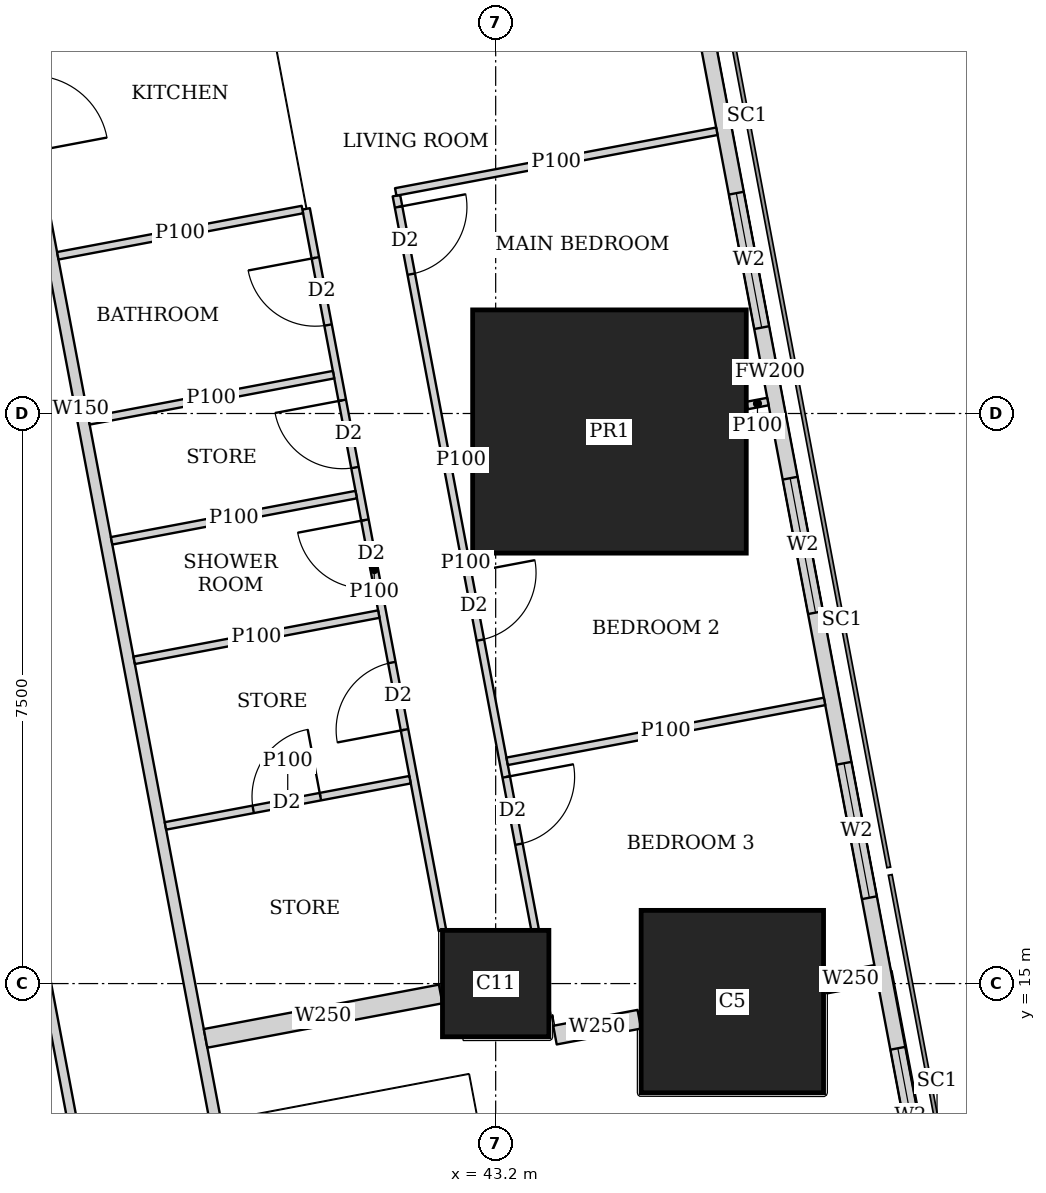
"""IFC4 building model, lengths in metres.
Left out: names, types, materials, properties, quantities, classifications, styles, units other than length and angle.
Written with IfcOpenShell. Run it as: python <this file> out.ifc"""

import sys

from ifc_helpers import new_model, si_unit, direction, frame, frame_2d, origin, origin_2d, place, context, subcontext, project, spatial, rectangle, extrude, element, fill, save


model = new_model("IFC4")
c1 = context("Model", 3, precision=1e-05, world=origin(), true_north=direction((0.0, 1.0)))
c2 = subcontext(c1, "Body", "Model", "MODEL_VIEW")
j1 = project(units=[si_unit("LENGTHUNIT", "METRE"), si_unit("PLANEANGLEUNIT", "RADIAN")], contexts=[c1])
p1 = place(None, origin())
s1 = spatial("IfcSite", under=j1, at=p1, CompositionType="ELEMENT")
p2 = place(p1, origin())
s2 = spatial("IfcBuilding", under=s1, at=p2, CompositionType="ELEMENT")
p3 = place(p2, frame((0.0, 0.0, 242.45)))
s3 = spatial("IfcBuildingStorey", under=s2, at=p3, CompositionType="ELEMENT", Elevation=242.45)
p4 = place(p3, frame((43.2, 15.0, 0.0), z_axis=(0.0, 0.0, 1.0), x_axis=(1.0, 0.0, 0.0)))
e1 = element("IfcColumn", 1, at=p4, inside=s3, PredefinedType="COLUMN", context=c2, shape_type="SweptSolid", body=[
    extrude(rectangle(XDim=1.4, YDim=1.4, at=origin_2d()), origin(), (0.0, 0.0, 1.0), 3.75),
])
p5 = place(p3, frame((46.314, 14.763, 0.0), z_axis=(0.0, 0.0, 1.0), x_axis=(1.0, 0.0, 0.0)))
e2 = element("IfcColumn", 2, at=p5, inside=s3, PredefinedType="COLUMN", context=c2, shape_type="SweptSolid", body=[
    extrude(rectangle(XDim=2.4, YDim=2.4, at=origin_2d()), origin(), (0.0, 0.0, 1.0), 3.75),
])
p6 = place(p3, frame((44.697, 22.263, 0.0), z_axis=(0.0, 0.0, 1.0), x_axis=(1.0, 0.0, 0.0)))
e3 = element("IfcColumn", 3, at=p6, inside=s3, PredefinedType="COLUMN", context=c2, shape_type="SweptSolid", body=[
    extrude(rectangle(XDim=3.6, YDim=3.2, at=origin_2d()), origin(), (0.0, 0.0, 1.0), 3.75),
])
p7 = place(p3, frame((50.653, 2.703, 0.0), z_axis=(0.0, 0.0, 1.0), x_axis=(-0.185612026696, 0.982623109613, 0.0)))
e4 = element("IfcWall", 4, at=p7, inside=s3, PredefinedType="SOLIDWALL", context=c2, shape_type="SweptSolid", body=[
    extrude(rectangle(XDim=41.393, YDim=0.2, at=frame_2d((20.697, 0.0))), origin(), (0.0, 0.0, 1.0), 3.45),
])
p8 = place(p7, frame((1.633, 0.0, 0.9)))
e5 = element("IfcOpeningElement", 5, at=p8, cuts=e4, PredefinedType="OPENING", context=c2, shape_type="SweptSolid", body=[
    extrude(rectangle(XDim=1.8, YDim=1.5, at=frame_2d((0.9, 0.75))), frame((0.0, 0.11, 0.0), z_axis=(0.0, -1.0, 0.0), x_axis=(1.0, 0.0, 0.0)), (0.0, 0.0, 1.0), 0.22),
])
p9 = place(p7, frame((6.032, 0.0, 0.9)))
e6 = element("IfcOpeningElement", 6, at=p9, cuts=e4, PredefinedType="OPENING", context=c2, shape_type="SweptSolid", body=[
    extrude(rectangle(XDim=1.8, YDim=1.5, at=frame_2d((0.9, 0.75))), frame((0.0, 0.11, 0.0), z_axis=(0.0, -1.0, 0.0), x_axis=(1.0, 0.0, 0.0)), (0.0, 0.0, 1.0), 0.22),
])
p10 = place(p7, frame((9.848, 0.0, 0.9)))
e7 = element("IfcOpeningElement", 7, at=p10, cuts=e4, PredefinedType="OPENING", context=c2, shape_type="SweptSolid", body=[
    extrude(rectangle(XDim=1.8, YDim=1.5, at=frame_2d((0.9, 0.75))), frame((0.0, 0.11, 0.0), z_axis=(0.0, -1.0, 0.0), x_axis=(1.0, 0.0, 0.0)), (0.0, 0.0, 1.0), 0.22),
])
p11 = place(p7, frame((13.664, 0.0, 0.9)))
e8 = element("IfcOpeningElement", 8, at=p11, cuts=e4, PredefinedType="OPENING", context=c2, shape_type="SweptSolid", body=[
    extrude(rectangle(XDim=1.8, YDim=1.5, at=frame_2d((0.9, 0.75))), frame((0.0, 0.11, 0.0), z_axis=(0.0, -1.0, 0.0), x_axis=(1.0, 0.0, 0.0)), (0.0, 0.0, 1.0), 0.22),
])
p12 = place(p7, frame((17.481, 0.0, 0.9)))
e9 = element("IfcOpeningElement", 9, at=p12, cuts=e4, PredefinedType="OPENING", context=c2, shape_type="SweptSolid", body=[
    extrude(rectangle(XDim=1.8, YDim=1.5, at=frame_2d((0.9, 0.75))), frame((0.0, 0.11, 0.0), z_axis=(0.0, -1.0, 0.0), x_axis=(1.0, 0.0, 0.0)), (0.0, 0.0, 1.0), 0.22),
])
p13 = place(p7, frame((21.297, 0.0, 0.9)))
e10 = element("IfcOpeningElement", 10, at=p13, cuts=e4, PredefinedType="OPENING", context=c2, shape_type="SweptSolid", body=[
    extrude(rectangle(XDim=1.8, YDim=1.5, at=frame_2d((0.9, 0.75))), frame((0.0, 0.11, 0.0), z_axis=(0.0, -1.0, 0.0), x_axis=(1.0, 0.0, 0.0)), (0.0, 0.0, 1.0), 0.22),
])
p14 = place(p7, frame((25.113, 0.0, 0.9)))
e11 = element("IfcOpeningElement", 11, at=p14, cuts=e4, PredefinedType="OPENING", context=c2, shape_type="SweptSolid", body=[
    extrude(rectangle(XDim=1.8, YDim=1.5, at=frame_2d((0.9, 0.75))), frame((0.0, 0.11, 0.0), z_axis=(0.0, -1.0, 0.0), x_axis=(1.0, 0.0, 0.0)), (0.0, 0.0, 1.0), 0.22),
])
p15 = place(p7, frame((28.93, 0.0, 0.9)))
e12 = element("IfcOpeningElement", 12, at=p15, cuts=e4, PredefinedType="OPENING", context=c2, shape_type="SweptSolid", body=[
    extrude(rectangle(XDim=1.8, YDim=1.5, at=frame_2d((0.9, 0.75))), frame((0.0, 0.11, 0.0), z_axis=(0.0, -1.0, 0.0), x_axis=(1.0, 0.0, 0.0)), (0.0, 0.0, 1.0), 0.22),
])
p16 = place(p7, frame((32.746, 0.0, 0.9)))
e13 = element("IfcOpeningElement", 13, at=p16, cuts=e4, PredefinedType="OPENING", context=c2, shape_type="SweptSolid", body=[
    extrude(rectangle(XDim=1.8, YDim=1.5, at=frame_2d((0.9, 0.75))), frame((0.0, 0.11, 0.0), z_axis=(0.0, -1.0, 0.0), x_axis=(1.0, 0.0, 0.0)), (0.0, 0.0, 1.0), 0.22),
])
p17 = place(p7, frame((36.481, 0.0, 0.9)))
e14 = element("IfcOpeningElement", 14, at=p17, cuts=e4, PredefinedType="OPENING", context=c2, shape_type="SweptSolid", body=[
    extrude(rectangle(XDim=1.8, YDim=1.5, at=frame_2d((0.9, 0.75))), frame((0.0, 0.11, 0.0), z_axis=(0.0, -1.0, 0.0), x_axis=(1.0, 0.0, 0.0)), (0.0, 0.0, 1.0), 0.22),
])
p18 = place(p3, frame((33.933, 42.73, 0.0), z_axis=(0.0, 0.0, 1.0), x_axis=(0.185595417643, -0.982626246825, 0.0)))
e15 = element("IfcWall", 15, at=p18, inside=s3, PredefinedType="SOLIDWALL", context=c2, shape_type="SweptSolid", body=[
    extrude(rectangle(XDim=41.051, YDim=0.15, at=frame_2d((20.525, 0.0))), origin(), (0.0, 0.0, 1.0), 2.45),
])
p19 = place(p18, frame((12.266, 0.0, 0.0)))
e16 = element("IfcOpeningElement", 16, at=p19, cuts=e15, PredefinedType="OPENING", context=c2, shape_type="SweptSolid", body=[
    extrude(rectangle(XDim=1.0, YDim=2.1, at=frame_2d((0.5, 1.05))), frame((0.0, 0.085, 0.0), z_axis=(0.0, -1.0, 0.0), x_axis=(1.0, 0.0, 0.0)), (0.0, 0.0, 1.0), 0.17),
])
p20 = place(p18, frame((16.082, 0.0, 0.0)))
e17 = element("IfcOpeningElement", 17, at=p20, cuts=e15, PredefinedType="OPENING", context=c2, shape_type="SweptSolid", body=[
    extrude(rectangle(XDim=1.0, YDim=2.1, at=frame_2d((0.5, 1.05))), frame((0.0, 0.085, 0.0), z_axis=(0.0, -1.0, 0.0), x_axis=(1.0, 0.0, 0.0)), (0.0, 0.0, 1.0), 0.17),
])
p21 = place(p18, frame((30.862, 0.0, 0.0)))
e18 = element("IfcOpeningElement", 18, at=p21, cuts=e15, PredefinedType="OPENING", context=c2, shape_type="SweptSolid", body=[
    extrude(rectangle(XDim=1.0, YDim=2.1, at=frame_2d((0.5, 1.05))), frame((0.0, 0.085, 0.0), z_axis=(0.0, -1.0, 0.0), x_axis=(1.0, 0.0, 0.0)), (0.0, 0.0, 1.0), 0.17),
])
p22 = place(p3, frame((41.894, 25.366, 0.0), z_axis=(0.0, 0.0, 1.0), x_axis=(0.185612905165, -0.982622943675, 0.0)))
e19 = element("IfcWall", 19, at=p22, inside=s3, PredefinedType="PARTITIONING", context=c2, shape_type="SweptSolid", body=[
    extrude(rectangle(XDim=9.827, YDim=0.1, at=frame_2d((4.913, 0.0))), origin(), (0.0, 0.0, 1.0), 2.45),
])
p23 = place(p22, frame((0.151, 0.0, 0.0)))
e20 = element("IfcOpeningElement", 20, at=p23, cuts=e19, PredefinedType="OPENING", context=c2, shape_type="SweptSolid", body=[
    extrude(rectangle(XDim=0.9, YDim=2.1, at=frame_2d((0.45, 1.05))), frame((0.0, 0.06, 0.0), z_axis=(0.0, -1.0, 0.0), x_axis=(1.0, 0.0, 0.0)), (0.0, 0.0, 1.0), 0.12),
])
p24 = place(p22, frame((5.05, 0.0, 0.0)))
e21 = element("IfcOpeningElement", 21, at=p24, cuts=e19, PredefinedType="OPENING", context=c2, shape_type="SweptSolid", body=[
    extrude(rectangle(XDim=0.9, YDim=2.1, at=frame_2d((0.45, 1.05))), frame((0.0, 0.06, 0.0), z_axis=(0.0, -1.0, 0.0), x_axis=(1.0, 0.0, 0.0)), (0.0, 0.0, 1.0), 0.12),
])
p25 = place(p22, frame((7.783, 0.0, 0.0)))
e22 = element("IfcOpeningElement", 22, at=p25, cuts=e19, PredefinedType="OPENING", context=c2, shape_type="SweptSolid", body=[
    extrude(rectangle(XDim=0.9, YDim=2.1, at=frame_2d((0.45, 1.05))), frame((0.0, 0.06, 0.0), z_axis=(0.0, -1.0, 0.0), x_axis=(1.0, 0.0, 0.0)), (0.0, 0.0, 1.0), 0.12),
])
p26 = place(p3, frame((40.706, 25.192, 0.0), z_axis=(0.0, 0.0, 1.0), x_axis=(0.185629824463, -0.982619747547, 0.0)))
e23 = element("IfcWall", 23, at=p26, inside=s3, PredefinedType="PARTITIONING", context=c2, shape_type="SweptSolid", body=[
    extrude(rectangle(XDim=9.659, YDim=0.1, at=frame_2d((4.83, 0.0))), origin(), (0.0, 0.0, 1.0), 2.45),
])
p27 = place(p26, frame((0.655, 0.0, 0.0)))
e24 = element("IfcOpeningElement", 24, at=p27, cuts=e23, PredefinedType="OPENING", context=c2, shape_type="SweptSolid", body=[
    extrude(rectangle(XDim=0.9, YDim=2.1, at=frame_2d((0.45, 1.05))), frame((0.0, 0.06, 0.0), z_axis=(0.0, -1.0, 0.0), x_axis=(1.0, 0.0, 0.0)), (0.0, 0.0, 1.0), 0.12),
])
p28 = place(p26, frame((4.166, 0.0, 0.0)))
e25 = element("IfcOpeningElement", 25, at=p28, cuts=e23, PredefinedType="OPENING", context=c2, shape_type="SweptSolid", body=[
    extrude(rectangle(XDim=0.9, YDim=2.1, at=frame_2d((0.45, 1.05))), frame((0.0, 0.06, 0.0), z_axis=(0.0, -1.0, 0.0), x_axis=(1.0, 0.0, 0.0)), (0.0, 0.0, 1.0), 0.12),
])
p29 = place(p26, frame((2.563, 0.0, 0.0)))
e26 = element("IfcOpeningElement", 26, at=p29, cuts=e23, PredefinedType="OPENING", context=c2, shape_type="SweptSolid", body=[
    extrude(rectangle(XDim=0.9, YDim=2.1, at=frame_2d((0.45, 1.05))), frame((0.0, 0.06, 0.0), z_axis=(0.0, -1.0, 0.0), x_axis=(1.0, 0.0, 0.0)), (0.0, 0.0, 1.0), 0.12),
])
p30 = place(p26, frame((6.074, 0.0, 0.0)))
e27 = element("IfcOpeningElement", 27, at=p30, cuts=e23, PredefinedType="OPENING", context=c2, shape_type="SweptSolid", body=[
    extrude(rectangle(XDim=0.9, YDim=2.1, at=frame_2d((0.45, 1.05))), frame((0.0, 0.06, 0.0), z_axis=(0.0, -1.0, 0.0), x_axis=(1.0, 0.0, 0.0)), (0.0, 0.0, 1.0), 0.12),
])
p31 = place(p3, frame((46.11, 26.213, 0.0), z_axis=(0.0, 0.0, 1.0), x_axis=(-0.982633535512, -0.185556823879, 0.0)))
e28 = element("IfcWall", 28, at=p31, inside=s3, PredefinedType="PARTITIONING", context=c2, shape_type="SweptSolid", body=[
    extrude(rectangle(XDim=4.3, YDim=0.1, at=frame_2d((2.15, 0.0))), origin(), (0.0, 0.0, 1.0), 2.0),
])
p32 = place(p3, frame((46.782, 22.657, 0.0), z_axis=(0.0, 0.0, 1.0), x_axis=(-0.982574553168, -0.185868898601, 0.0)))
e29 = element("IfcWall", 29, at=p32, inside=s3, PredefinedType="PARTITIONING", context=c2, shape_type="SweptSolid", body=[
    extrude(rectangle(XDim=0.28, YDim=0.1, at=frame_2d((0.14, 0.0))), origin(), (0.0, 0.0, 1.0), 3.45),
])
p33 = place(p3, frame((42.887, 21.921, 0.0), z_axis=(0.0, 0.0, 1.0), x_axis=(-0.982688058078, -0.185267861514, 0.0)))
e30 = element("IfcWall", 30, at=p33, inside=s3, PredefinedType="PARTITIONING", context=c2, shape_type="SweptSolid", body=[
    extrude(rectangle(XDim=0.286, YDim=0.1, at=frame_2d((0.143, 0.0))), origin(), (0.0, 0.0, 1.0), 2.45),
])
p34 = place(p3, frame((47.527, 18.712, 0.0), z_axis=(0.0, 0.0, 1.0), x_axis=(-0.982665405803, -0.185387972203, 0.0)))
e31 = element("IfcWall", 31, at=p34, inside=s3, PredefinedType="PARTITIONING", context=c2, shape_type="SweptSolid", body=[
    extrude(rectangle(XDim=4.25, YDim=0.1, at=frame_2d((2.125, 0.0))), origin(), (0.0, 0.0, 1.0), 2.0),
])
for number, where, z_axis, x_axis in (
    (32, (40.657, 25.183, 0.0), (0.0, 0.0, 1.0), (-0.983, -0.186, 0.0)),
    (33, (41.365, 21.433, 0.0), (0.0, 0.0, 1.0), (-0.983, -0.186, 0.0)),
):
    element("IfcWall", number, at=place(p3, frame(where, z_axis=z_axis, x_axis=x_axis)), inside=s3, PredefinedType="PARTITIONING", context=c2, shape_type="SweptSolid", body=[
        extrude(rectangle(XDim=3.275, YDim=0.1, at=frame_2d((1.637, 0.0))), origin(), (0.0, 0.0, 1.0), 3.45),
    ])
p35 = place(p3, frame((42.073, 17.682, 0.0), z_axis=(0.0, 0.0, 1.0), x_axis=(-0.982620626894, -0.185625169636, 0.0)))
e34 = element("IfcWall", 34, at=p35, inside=s3, PredefinedType="PARTITIONING", context=c2, shape_type="SweptSolid", body=[
    extrude(rectangle(XDim=3.275, YDim=0.1, at=frame_2d((1.637, 0.0))), origin(), (0.0, 0.0, 1.0), 3.45),
])
p36 = place(p35, frame((1.2, 0.0, 0.0)))
e35 = element("IfcOpeningElement", 35, at=p36, cuts=e34, PredefinedType="OPENING", context=c2, shape_type="SweptSolid", body=[
    extrude(rectangle(XDim=0.9, YDim=2.1, at=frame_2d((0.45, 1.05))), frame((0.0, 0.06, 0.0), z_axis=(0.0, -1.0, 0.0), x_axis=(1.0, 0.0, 0.0)), (0.0, 0.0, 1.0), 0.12),
])
p37 = place(p3, frame((41.067, 23.011, 0.0), z_axis=(0.0, 0.0, 1.0), x_axis=(-0.982618057925, -0.185638768151, 0.0)))
e36 = element("IfcWall", 36, at=p37, inside=s3, PredefinedType="PARTITIONING", context=c2, shape_type="SweptSolid", body=[
    extrude(rectangle(XDim=3.275, YDim=0.1, at=frame_2d((1.637, 0.0))), origin(), (0.0, 0.0, 1.0), 2.45),
])
p38 = place(p3, frame((41.662, 19.861, 0.0), z_axis=(0.0, 0.0, 1.0), x_axis=(-0.982607026909, -0.185697147715, 0.0)))
e37 = element("IfcWall", 37, at=p38, inside=s3, PredefinedType="PARTITIONING", context=c2, shape_type="SweptSolid", body=[
    extrude(rectangle(XDim=3.275, YDim=0.1, at=frame_2d((1.637, 0.0))), origin(), (0.0, 0.0, 1.0), 3.45),
])
p39 = place(p3, frame((48.206, 15.12, 0.0), z_axis=(0.0, 0.0, 1.0), x_axis=(-0.982610999048, -0.18567612811, 0.0)))
e38 = element("IfcWall", 38, at=p39, inside=s3, PredefinedType="SOLIDWALL", context=c2, shape_type="SweptSolid", body=[
    extrude(rectangle(XDim=0.68, YDim=0.25, at=frame_2d((0.34, 0.0))), origin(), (0.0, 0.0, 1.0), 2.0),
])
p40 = place(p3, frame((45.09, 14.531, 0.0), z_axis=(0.0, 0.0, 1.0), x_axis=(-0.982737354171, -0.185006196431, 0.0)))
e39 = element("IfcWall", 39, at=p40, inside=s3, PredefinedType="SOLIDWALL", context=c2, shape_type="SweptSolid", body=[
    extrude(rectangle(XDim=1.13, YDim=0.25, at=frame_2d((0.565, 0.0))), origin(), (0.0, 0.0, 1.0), 2.0),
])
p41 = place(p3, frame((42.476, 14.863, 0.0), z_axis=(0.0, 0.0, 1.0), x_axis=(-0.982638716117, -0.185529387398, 0.0)))
e40 = element("IfcWall", 40, at=p41, inside=s3, PredefinedType="SOLIDWALL", context=c2, shape_type="SweptSolid", body=[
    extrude(rectangle(XDim=3.148, YDim=0.25, at=frame_2d((1.574, 0.0))), origin(), (0.0, 0.0, 1.0), 3.45),
])
p42 = place(p3, frame((38.202, 10.163, 0.0), z_axis=(0.0, 0.0, 1.0), x_axis=(-0.185610321132, 0.982623431783, 0.0)))
e41 = element("IfcWall", 41, at=p42, inside=s3, PredefinedType="PARTITIONING", context=c2, shape_type="SweptSolid", body=[
    extrude(rectangle(XDim=25.111, YDim=0.125, at=frame_2d((12.556, 0.0))), origin(), (0.0, 0.0, 1.0), 2.45),
])
p43 = place(p42, frame((0.708, 0.0, 0.0)))
e42 = element("IfcOpeningElement", 42, at=p43, cuts=e41, PredefinedType="OPENING", context=c2, shape_type="SweptSolid", body=[
    extrude(rectangle(XDim=1.0, YDim=2.1, at=frame_2d((0.5, 1.05))), frame((0.0, 0.073, 0.0), z_axis=(0.0, -1.0, 0.0), x_axis=(1.0, 0.0, 0.0)), (0.0, 0.0, 1.0), 0.145),
])
p44 = place(p42, frame((13.378, 0.0, 0.0)))
e43 = element("IfcOpeningElement", 43, at=p44, cuts=e41, PredefinedType="OPENING", context=c2, shape_type="SweptSolid", body=[
    extrude(rectangle(XDim=1.0, YDim=2.1, at=frame_2d((0.5, 1.05))), frame((0.0, 0.073, 0.0), z_axis=(0.0, -1.0, 0.0), x_axis=(1.0, 0.0, 0.0)), (0.0, 0.0, 1.0), 0.145),
])
p45 = place(p42, frame((21.15, 0.0, 0.0)))
e44 = element("IfcOpeningElement", 44, at=p45, cuts=e41, PredefinedType="OPENING", context=c2, shape_type="SweptSolid", body=[
    extrude(rectangle(XDim=1.0, YDim=2.1, at=frame_2d((0.5, 1.05))), frame((0.0, 0.073, 0.0), z_axis=(0.0, -1.0, 0.0), x_axis=(1.0, 0.0, 0.0)), (0.0, 0.0, 1.0), 0.145),
])
p46 = place(p42, frame((23.453, 0.0, 0.0)))
e45 = element("IfcOpeningElement", 45, at=p46, cuts=e41, PredefinedType="OPENING", context=c2, shape_type="SweptSolid", body=[
    extrude(rectangle(XDim=1.0, YDim=2.1, at=frame_2d((0.5, 1.05))), frame((0.0, 0.073, 0.0), z_axis=(0.0, -1.0, 0.0), x_axis=(1.0, 0.0, 0.0)), (0.0, 0.0, 1.0), 0.145),
])
p47 = place(p10, origin())
e46 = element("IfcWindow", 46, at=p47, inside=s3, PartitioningType="SINGLE_PANEL", PredefinedType="WINDOW", context=c2, shape_type="SweptSolid", body=[
    extrude(rectangle(XDim=1.8, YDim=1.5, at=frame_2d((0.9, 0.75))), frame((0.0, 0.03, 0.0), z_axis=(0.0, -1.0, 0.0), x_axis=(1.0, 0.0, 0.0)), (0.0, 0.0, 1.0), 0.06),
])
fill(e7, e46)
p48 = place(p11, origin())
e47 = element("IfcWindow", 47, at=p48, inside=s3, PartitioningType="SINGLE_PANEL", PredefinedType="WINDOW", context=c2, shape_type="SweptSolid", body=[
    extrude(rectangle(XDim=1.8, YDim=1.5, at=frame_2d((0.9, 0.75))), frame((0.0, 0.03, 0.0), z_axis=(0.0, -1.0, 0.0), x_axis=(1.0, 0.0, 0.0)), (0.0, 0.0, 1.0), 0.06),
])
fill(e8, e47)
p49 = place(p12, origin())
e48 = element("IfcWindow", 48, at=p49, inside=s3, PartitioningType="SINGLE_PANEL", PredefinedType="WINDOW", context=c2, shape_type="SweptSolid", body=[
    extrude(rectangle(XDim=1.8, YDim=1.5, at=frame_2d((0.9, 0.75))), frame((0.0, 0.03, 0.0), z_axis=(0.0, -1.0, 0.0), x_axis=(1.0, 0.0, 0.0)), (0.0, 0.0, 1.0), 0.06),
])
fill(e9, e48)
p50 = place(p13, origin())
e49 = element("IfcWindow", 49, at=p50, inside=s3, PartitioningType="SINGLE_PANEL", PredefinedType="WINDOW", context=c2, shape_type="SweptSolid", body=[
    extrude(rectangle(XDim=1.8, YDim=1.5, at=frame_2d((0.9, 0.75))), frame((0.0, 0.03, 0.0), z_axis=(0.0, -1.0, 0.0), x_axis=(1.0, 0.0, 0.0)), (0.0, 0.0, 1.0), 0.06),
])
fill(e10, e49)
p51 = place(p23, origin())
e50 = element("IfcDoor", 50, at=p51, inside=s3, OperationType="SINGLE_SWING_LEFT", PredefinedType="DOOR", context=c2, shape_type="SweptSolid", body=[
    extrude(rectangle(XDim=0.9, YDim=2.1, at=frame_2d((0.45, 1.05))), frame((0.0, 0.025, 0.0), z_axis=(0.0, -1.0, 0.0), x_axis=(1.0, 0.0, 0.0)), (0.0, 0.0, 1.0), 0.05),
])
fill(e20, e50)
p52 = place(p24, origin())
e51 = element("IfcDoor", 51, at=p52, inside=s3, OperationType="SINGLE_SWING_LEFT", PredefinedType="DOOR", context=c2, shape_type="SweptSolid", body=[
    extrude(rectangle(XDim=0.9, YDim=2.1, at=frame_2d((0.45, 1.05))), frame((0.0, 0.025, 0.0), z_axis=(0.0, -1.0, 0.0), x_axis=(1.0, 0.0, 0.0)), (0.0, 0.0, 1.0), 0.05),
])
fill(e21, e51)
p53 = place(p25, origin())
e52 = element("IfcDoor", 52, at=p53, inside=s3, OperationType="SINGLE_SWING_LEFT", PredefinedType="DOOR", context=c2, shape_type="SweptSolid", body=[
    extrude(rectangle(XDim=0.9, YDim=2.1, at=frame_2d((0.45, 1.05))), frame((0.0, 0.025, 0.0), z_axis=(0.0, -1.0, 0.0), x_axis=(1.0, 0.0, 0.0)), (0.0, 0.0, 1.0), 0.05),
])
fill(e22, e52)
p54 = place(p27, origin())
e53 = element("IfcDoor", 53, at=p54, inside=s3, OperationType="SINGLE_SWING_RIGHT", PredefinedType="DOOR", context=c2, shape_type="SweptSolid", body=[
    extrude(rectangle(XDim=0.9, YDim=2.1, at=frame_2d((0.45, 1.05))), frame((0.0, 0.025, 0.0), z_axis=(0.0, -1.0, 0.0), x_axis=(1.0, 0.0, 0.0)), (0.0, 0.0, 1.0), 0.05),
])
fill(e24, e53)
p55 = place(p28, origin())
e54 = element("IfcDoor", 54, at=p55, inside=s3, OperationType="SINGLE_SWING_RIGHT", PredefinedType="DOOR", context=c2, shape_type="SweptSolid", body=[
    extrude(rectangle(XDim=0.9, YDim=2.1, at=frame_2d((0.45, 1.05))), frame((0.0, 0.025, 0.0), z_axis=(0.0, -1.0, 0.0), x_axis=(1.0, 0.0, 0.0)), (0.0, 0.0, 1.0), 0.05),
])
fill(e25, e54)
p56 = place(p29, origin())
e55 = element("IfcDoor", 55, at=p56, inside=s3, OperationType="SINGLE_SWING_RIGHT", PredefinedType="DOOR", context=c2, shape_type="SweptSolid", body=[
    extrude(rectangle(XDim=0.9, YDim=2.1, at=frame_2d((0.45, 1.05))), frame((0.0, 0.025, 0.0), z_axis=(0.0, -1.0, 0.0), x_axis=(1.0, 0.0, 0.0)), (0.0, 0.0, 1.0), 0.05),
])
fill(e26, e55)
p57 = place(p30, origin())
e56 = element("IfcDoor", 56, at=p57, inside=s3, OperationType="SINGLE_SWING_LEFT", PredefinedType="DOOR", context=c2, shape_type="SweptSolid", body=[
    extrude(rectangle(XDim=0.9, YDim=2.1, at=frame_2d((0.45, 1.05))), frame((0.0, 0.025, 0.0), z_axis=(0.0, -1.0, 0.0), x_axis=(1.0, 0.0, 0.0)), (0.0, 0.0, 1.0), 0.05),
])
fill(e27, e56)
p58 = place(p36, origin())
e57 = element("IfcDoor", 57, at=p58, inside=s3, OperationType="SINGLE_SWING_RIGHT", PredefinedType="DOOR", context=c2, shape_type="SweptSolid", body=[
    extrude(rectangle(XDim=0.9, YDim=2.1, at=frame_2d((0.45, 1.05))), frame((0.0, 0.025, 0.0), z_axis=(0.0, -1.0, 0.0), x_axis=(1.0, 0.0, 0.0)), (0.0, 0.0, 1.0), 0.05),
])
fill(e35, e57)
save(model, sys.argv[1])
